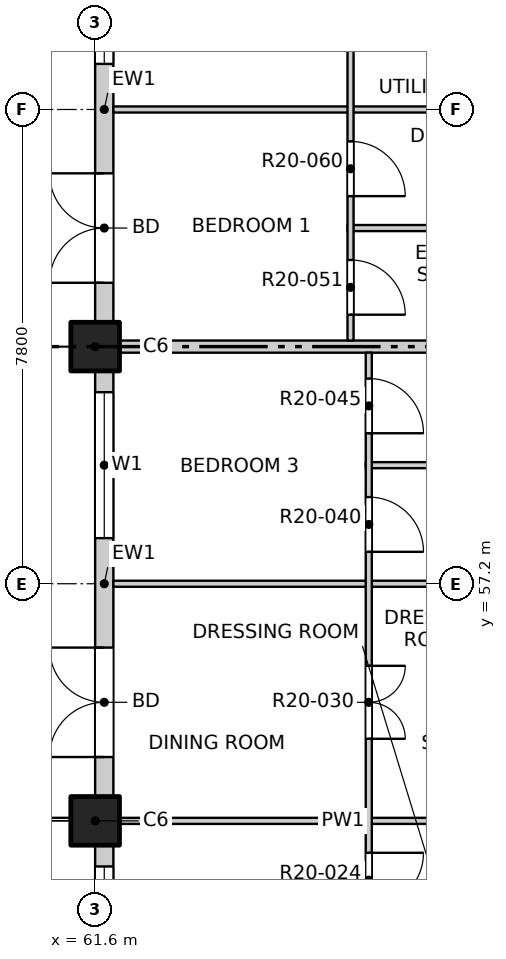
"""IFC4 building model, lengths in metres.
Left out: names, types, materials, properties, quantities, classifications, styles, units other than length and angle.
Written with IfcOpenShell. Run it as: python <this file> out.ifc"""

import sys

from ifc_helpers import new_model, si_unit, direction, frame, frame_2d, origin, origin_2d, place, context, subcontext, project, spatial, rectangle, extrude, element, fill, save


model = new_model("IFC4")
c1 = context("Model", 3, precision=1e-05, world=origin(), true_north=direction((0.0, 1.0)))
c2 = subcontext(c1, "Body", "Model", "MODEL_VIEW")
j1 = project(units=[si_unit("LENGTHUNIT", "METRE"), si_unit("PLANEANGLEUNIT", "RADIAN")], contexts=[c1])
p1 = place(None, origin())
s1 = spatial("IfcSite", under=j1, at=p1, CompositionType="ELEMENT")
p2 = place(p1, origin())
s2 = spatial("IfcBuilding", under=s1, at=p2, CompositionType="ELEMENT")
p3 = place(p2, frame((0.0, 0.0, 204.1)))
s3 = spatial("IfcBuildingStorey", under=s2, at=p3, CompositionType="ELEMENT", Elevation=204.1)
for number, where, z_axis, x_axis in (
    (1, (61.6, 53.3, -0.25), (0.0, 0.0, 1.0), (1.0, 0.0, 0.0)),
    (2, (61.6, 61.1, -0.25), (0.0, 0.0, 1.0), (1.0, 0.0, 0.0)),
):
    element("IfcColumn", number, at=place(p3, frame(where, z_axis=z_axis, x_axis=x_axis)), inside=s3, PredefinedType="COLUMN", context=c2, shape_type="SweptSolid", body=[
        extrude(rectangle(XDim=0.8, YDim=0.8, at=origin_2d()), origin(), (0.0, 0.0, 1.0), 3.4),
    ])
p4 = place(p3, frame((61.75, 45.5, 0.0), z_axis=(0.0, 0.0, 1.0), x_axis=(0.0, 1.0, 0.0)))
e3 = element("IfcWall", 3, at=p4, inside=s3, PredefinedType="SOLIDWALL", context=c2, shape_type="SweptSolid", body=[
    extrude(rectangle(XDim=7.4, YDim=0.3, at=frame_2d((3.7, 0.0))), origin(), (0.0, 0.0, 1.0), 2.7),
])
p5 = place(p4, frame((0.75, 0.0, 0.9)))
e4 = element("IfcOpeningElement", 4, at=p5, cuts=e3, PredefinedType="OPENING", context=c2, shape_type="SweptSolid", body=[
    extrude(rectangle(XDim=2.4, YDim=1.8, at=frame_2d((1.2, 0.9))), frame((0.0, 0.16, 0.0), z_axis=(0.0, -1.0, 0.0), x_axis=(1.0, 0.0, 0.0)), (0.0, 0.0, 1.0), 0.32),
])
p6 = place(p4, frame((4.65, 0.0, 0.9)))
e5 = element("IfcOpeningElement", 5, at=p6, cuts=e3, PredefinedType="OPENING", context=c2, shape_type="SweptSolid", body=[
    extrude(rectangle(XDim=2.4, YDim=1.8, at=frame_2d((1.2, 0.9))), frame((0.0, 0.16, 0.0), z_axis=(0.0, -1.0, 0.0), x_axis=(1.0, 0.0, 0.0)), (0.0, 0.0, 1.0), 0.32),
])
p7 = place(p3, frame((61.75, 53.7, 0.0), z_axis=(0.0, 0.0, 1.0), x_axis=(0.0, 1.0, 0.0)))
e6 = element("IfcWall", 6, at=p7, inside=s3, PredefinedType="SOLIDWALL", context=c2, shape_type="SweptSolid", body=[
    extrude(rectangle(XDim=7.0, YDim=0.3, at=frame_2d((3.5, 0.0))), origin(), (0.0, 0.0, 1.0), 2.7),
])
p8 = place(p7, frame((0.65, 0.0, 0.0)))
e7 = element("IfcOpeningElement", 7, at=p8, cuts=e6, PredefinedType="OPENING", context=c2, shape_type="SweptSolid", body=[
    extrude(rectangle(XDim=1.8, YDim=2.4, at=frame_2d((0.9, 1.2))), frame((0.0, 0.16, 0.0), z_axis=(0.0, -1.0, 0.0), x_axis=(1.0, 0.0, 0.0)), (0.0, 0.0, 1.0), 0.32),
])
p9 = place(p7, frame((4.25, 0.0, 0.9)))
e8 = element("IfcOpeningElement", 8, at=p9, cuts=e6, PredefinedType="OPENING", context=c2, shape_type="SweptSolid", body=[
    extrude(rectangle(XDim=2.4, YDim=1.8, at=frame_2d((1.2, 0.9))), frame((0.0, 0.16, 0.0), z_axis=(0.0, -1.0, 0.0), x_axis=(1.0, 0.0, 0.0)), (0.0, 0.0, 1.0), 0.32),
])
p10 = place(p3, frame((61.75, 61.5, 0.0), z_axis=(0.0, 0.0, 1.0), x_axis=(0.0, 1.0, 0.0)))
e9 = element("IfcWall", 9, at=p10, inside=s3, PredefinedType="SOLIDWALL", context=c2, shape_type="SweptSolid", body=[
    extrude(rectangle(XDim=7.0, YDim=0.3, at=frame_2d((3.5, 0.0))), origin(), (0.0, 0.0, 1.0), 2.7),
])
p11 = place(p10, frame((0.65, 0.0, 0.0)))
e10 = element("IfcOpeningElement", 10, at=p11, cuts=e9, PredefinedType="OPENING", context=c2, shape_type="SweptSolid", body=[
    extrude(rectangle(XDim=1.8, YDim=2.4, at=frame_2d((0.9, 1.2))), frame((0.0, 0.16, 0.0), z_axis=(0.0, -1.0, 0.0), x_axis=(1.0, 0.0, 0.0)), (0.0, 0.0, 1.0), 0.32),
])
p12 = place(p10, frame((4.25, 0.0, 0.9)))
e11 = element("IfcOpeningElement", 11, at=p12, cuts=e9, PredefinedType="OPENING", context=c2, shape_type="SweptSolid", body=[
    extrude(rectangle(XDim=2.4, YDim=1.8, at=frame_2d((1.2, 0.9))), frame((0.0, 0.16, 0.0), z_axis=(0.0, -1.0, 0.0), x_axis=(1.0, 0.0, 0.0)), (0.0, 0.0, 1.0), 0.32),
])
for number, where, z_axis, x_axis in (
    (12, (61.9, 53.3, 0.0), (0.0, 0.0, 1.0), (1.0, 0.0, 0.0)),
    (13, (61.9, 57.2, 0.0), (0.0, 0.0, 1.0), (1.0, 0.0, 0.0)),
):
    element("IfcWall", number, at=place(p3, frame(where, z_axis=z_axis, x_axis=x_axis)), inside=s3, PredefinedType="PARTITIONING", context=c2, shape_type="SweptSolid", body=[
        extrude(rectangle(XDim=7.55, YDim=0.1, at=frame_2d((3.775, 0.0))), origin(), (0.0, 0.0, 1.0), 3.15),
    ])
p13 = place(p3, frame((66.05, 59.15, 0.0), z_axis=(0.0, 0.0, 1.0), x_axis=(1.0, 0.0, 0.0)))
e14 = element("IfcWall", 14, at=p13, inside=s3, PredefinedType="PARTITIONING", context=c2, shape_type="SweptSolid", body=[
    extrude(rectangle(XDim=3.4, YDim=0.1, at=frame_2d((1.7, 0.0))), origin(), (0.0, 0.0, 1.0), 3.15),
])
p14 = place(p3, frame((61.9, 61.1, 0.0), z_axis=(0.0, 0.0, 1.0), x_axis=(1.0, 0.0, 0.0)))
e15 = element("IfcWall", 15, at=p14, inside=s3, PredefinedType="PARTITIONING", context=c2, shape_type="SweptSolid", body=[
    extrude(rectangle(XDim=11.5, YDim=0.2, at=frame_2d((5.75, 0.0))), origin(), (0.0, 0.0, 1.0), 2.55),
])
p15 = place(p3, frame((65.75, 63.05, 0.0), z_axis=(0.0, 0.0, 1.0), x_axis=(1.0, 0.0, 0.0)))
e16 = element("IfcWall", 16, at=p15, inside=s3, PredefinedType="PARTITIONING", context=c2, shape_type="SweptSolid", body=[
    extrude(rectangle(XDim=3.7, YDim=0.1, at=frame_2d((1.85, 0.0))), origin(), (0.0, 0.0, 1.0), 3.15),
])
p16 = place(p3, frame((61.9, 65.0, 0.0), z_axis=(0.0, 0.0, 1.0), x_axis=(1.0, 0.0, 0.0)))
e17 = element("IfcWall", 17, at=p16, inside=s3, PredefinedType="PARTITIONING", context=c2, shape_type="SweptSolid", body=[
    extrude(rectangle(XDim=7.55, YDim=0.1, at=frame_2d((3.775, 0.0))), origin(), (0.0, 0.0, 1.0), 3.15),
])
p17 = place(p3, frame((65.8, 61.2, 0.0), z_axis=(0.0, 0.0, 1.0), x_axis=(0.0, 1.0, 0.0)))
e18 = element("IfcWall", 18, at=p17, inside=s3, PredefinedType="PARTITIONING", context=c2, shape_type="SweptSolid", body=[
    extrude(rectangle(XDim=26.9, YDim=0.1, at=frame_2d((13.45, 0.0))), origin(), (0.0, 0.0, 1.0), 3.15),
])
p18 = place(p17, frame((0.425, 0.0, 0.0)))
e19 = element("IfcOpeningElement", 19, at=p18, cuts=e18, PredefinedType="OPENING", context=c2, shape_type="SweptSolid", body=[
    extrude(rectangle(XDim=0.9, YDim=2.1, at=frame_2d((0.45, 1.05))), frame((0.0, 0.06, 0.0), z_axis=(0.0, -1.0, 0.0), x_axis=(1.0, 0.0, 0.0)), (0.0, 0.0, 1.0), 0.12),
])
p19 = place(p17, frame((2.375, 0.0, 0.0)))
e20 = element("IfcOpeningElement", 20, at=p19, cuts=e18, PredefinedType="OPENING", context=c2, shape_type="SweptSolid", body=[
    extrude(rectangle(XDim=0.9, YDim=2.1, at=frame_2d((0.45, 1.05))), frame((0.0, 0.06, 0.0), z_axis=(0.0, -1.0, 0.0), x_axis=(1.0, 0.0, 0.0)), (0.0, 0.0, 1.0), 0.12),
])
p20 = place(p17, frame((5.15, 0.0, 0.0)))
e21 = element("IfcOpeningElement", 21, at=p20, cuts=e18, PredefinedType="OPENING", context=c2, shape_type="SweptSolid", body=[
    extrude(rectangle(XDim=1.2, YDim=2.1, at=frame_2d((0.6, 1.05))), frame((0.0, 0.06, 0.0), z_axis=(0.0, -1.0, 0.0), x_axis=(1.0, 0.0, 0.0)), (0.0, 0.0, 1.0), 0.12),
])
p21 = place(p17, frame((9.05, 0.0, 0.0)))
e22 = element("IfcOpeningElement", 22, at=p21, cuts=e18, PredefinedType="OPENING", context=c2, shape_type="SweptSolid", body=[
    extrude(rectangle(XDim=1.2, YDim=2.1, at=frame_2d((0.6, 1.05))), frame((0.0, 0.06, 0.0), z_axis=(0.0, -1.0, 0.0), x_axis=(1.0, 0.0, 0.0)), (0.0, 0.0, 1.0), 0.12),
])
p22 = place(p17, frame((12.125, 0.0, 0.0)))
e23 = element("IfcOpeningElement", 23, at=p22, cuts=e18, PredefinedType="OPENING", context=c2, shape_type="SweptSolid", body=[
    extrude(rectangle(XDim=0.9, YDim=2.1, at=frame_2d((0.45, 1.05))), frame((0.0, 0.06, 0.0), z_axis=(0.0, -1.0, 0.0), x_axis=(1.0, 0.0, 0.0)), (0.0, 0.0, 1.0), 0.12),
])
p23 = place(p17, frame((14.075, 0.0, 0.0)))
e24 = element("IfcOpeningElement", 24, at=p23, cuts=e18, PredefinedType="OPENING", context=c2, shape_type="SweptSolid", body=[
    extrude(rectangle(XDim=0.9, YDim=2.1, at=frame_2d((0.45, 1.05))), frame((0.0, 0.06, 0.0), z_axis=(0.0, -1.0, 0.0), x_axis=(1.0, 0.0, 0.0)), (0.0, 0.0, 1.0), 0.12),
])
p24 = place(p17, frame((16.025, 0.0, 0.0)))
e25 = element("IfcOpeningElement", 25, at=p24, cuts=e18, PredefinedType="OPENING", context=c2, shape_type="SweptSolid", body=[
    extrude(rectangle(XDim=0.9, YDim=2.1, at=frame_2d((0.45, 1.05))), frame((0.0, 0.06, 0.0), z_axis=(0.0, -1.0, 0.0), x_axis=(1.0, 0.0, 0.0)), (0.0, 0.0, 1.0), 0.12),
])
p25 = place(p17, frame((17.975, 0.0, 0.0)))
e26 = element("IfcOpeningElement", 26, at=p25, cuts=e18, PredefinedType="OPENING", context=c2, shape_type="SweptSolid", body=[
    extrude(rectangle(XDim=0.9, YDim=2.1, at=frame_2d((0.45, 1.05))), frame((0.0, 0.06, 0.0), z_axis=(0.0, -1.0, 0.0), x_axis=(1.0, 0.0, 0.0)), (0.0, 0.0, 1.0), 0.12),
])
p26 = place(p17, frame((20.75, 0.0, 0.0)))
e27 = element("IfcOpeningElement", 27, at=p26, cuts=e18, PredefinedType="OPENING", context=c2, shape_type="SweptSolid", body=[
    extrude(rectangle(XDim=1.2, YDim=2.1, at=frame_2d((0.6, 1.05))), frame((0.0, 0.06, 0.0), z_axis=(0.0, -1.0, 0.0), x_axis=(1.0, 0.0, 0.0)), (0.0, 0.0, 1.0), 0.12),
])
p27 = place(p17, frame((24.65, 0.0, 0.0)))
e28 = element("IfcOpeningElement", 28, at=p27, cuts=e18, PredefinedType="OPENING", context=c2, shape_type="SweptSolid", body=[
    extrude(rectangle(XDim=1.2, YDim=2.1, at=frame_2d((0.6, 1.05))), frame((0.0, 0.06, 0.0), z_axis=(0.0, -1.0, 0.0), x_axis=(1.0, 0.0, 0.0)), (0.0, 0.0, 1.0), 0.12),
])
p28 = place(p3, frame((66.1, 41.9, 0.0), z_axis=(0.0, 0.0, 1.0), x_axis=(0.0, 1.0, 0.0)))
e29 = element("IfcWall", 29, at=p28, inside=s3, PredefinedType="PARTITIONING", context=c2, shape_type="SweptSolid", body=[
    extrude(rectangle(XDim=19.1, YDim=0.1, at=frame_2d((9.55, 0.0))), origin(), (0.0, 0.0, 1.0), 3.15),
])
p29 = place(p28, frame((1.05, 0.0, 0.0)))
e30 = element("IfcOpeningElement", 30, at=p29, cuts=e29, PredefinedType="OPENING", context=c2, shape_type="SweptSolid", body=[
    extrude(rectangle(XDim=1.2, YDim=2.1, at=frame_2d((0.6, 1.05))), frame((0.0, 0.06, 0.0), z_axis=(0.0, -1.0, 0.0), x_axis=(1.0, 0.0, 0.0)), (0.0, 0.0, 1.0), 0.12),
])
p30 = place(p28, frame((4.95, 0.0, 0.0)))
e31 = element("IfcOpeningElement", 31, at=p30, cuts=e29, PredefinedType="OPENING", context=c2, shape_type="SweptSolid", body=[
    extrude(rectangle(XDim=1.2, YDim=2.1, at=frame_2d((0.6, 1.05))), frame((0.0, 0.06, 0.0), z_axis=(0.0, -1.0, 0.0), x_axis=(1.0, 0.0, 0.0)), (0.0, 0.0, 1.0), 0.12),
])
p31 = place(p28, frame((8.025, 0.0, 0.0)))
e32 = element("IfcOpeningElement", 32, at=p31, cuts=e29, PredefinedType="OPENING", context=c2, shape_type="SweptSolid", body=[
    extrude(rectangle(XDim=0.9, YDim=2.1, at=frame_2d((0.45, 1.05))), frame((0.0, 0.06, 0.0), z_axis=(0.0, -1.0, 0.0), x_axis=(1.0, 0.0, 0.0)), (0.0, 0.0, 1.0), 0.12),
])
p32 = place(p28, frame((9.975, 0.0, 0.0)))
e33 = element("IfcOpeningElement", 33, at=p32, cuts=e29, PredefinedType="OPENING", context=c2, shape_type="SweptSolid", body=[
    extrude(rectangle(XDim=0.9, YDim=2.1, at=frame_2d((0.45, 1.05))), frame((0.0, 0.06, 0.0), z_axis=(0.0, -1.0, 0.0), x_axis=(1.0, 0.0, 0.0)), (0.0, 0.0, 1.0), 0.12),
])
p33 = place(p28, frame((12.75, 0.0, 0.0)))
e34 = element("IfcOpeningElement", 34, at=p33, cuts=e29, PredefinedType="OPENING", context=c2, shape_type="SweptSolid", body=[
    extrude(rectangle(XDim=1.2, YDim=2.1, at=frame_2d((0.6, 1.05))), frame((0.0, 0.06, 0.0), z_axis=(0.0, -1.0, 0.0), x_axis=(1.0, 0.0, 0.0)), (0.0, 0.0, 1.0), 0.12),
])
p34 = place(p28, frame((15.825, 0.0, 0.0)))
e35 = element("IfcOpeningElement", 35, at=p34, cuts=e29, PredefinedType="OPENING", context=c2, shape_type="SweptSolid", body=[
    extrude(rectangle(XDim=0.9, YDim=2.1, at=frame_2d((0.45, 1.05))), frame((0.0, 0.06, 0.0), z_axis=(0.0, -1.0, 0.0), x_axis=(1.0, 0.0, 0.0)), (0.0, 0.0, 1.0), 0.12),
])
p35 = place(p28, frame((17.775, 0.0, 0.0)))
e36 = element("IfcOpeningElement", 36, at=p35, cuts=e29, PredefinedType="OPENING", context=c2, shape_type="SweptSolid", body=[
    extrude(rectangle(XDim=0.9, YDim=2.1, at=frame_2d((0.45, 1.05))), frame((0.0, 0.06, 0.0), z_axis=(0.0, -1.0, 0.0), x_axis=(1.0, 0.0, 0.0)), (0.0, 0.0, 1.0), 0.12),
])
p36 = place(p6, origin())
e37 = element("IfcWindow", 37, at=p36, inside=s3, PartitioningType="DOUBLE_PANEL_VERTICAL", PredefinedType="WINDOW", context=c2, shape_type="SweptSolid", body=[
    extrude(rectangle(XDim=2.4, YDim=1.8, at=frame_2d((1.2, 0.9))), frame((0.0, 0.03, 0.0), z_axis=(0.0, -1.0, 0.0), x_axis=(1.0, 0.0, 0.0)), (0.0, 0.0, 1.0), 0.06),
])
fill(e5, e37)
p37 = place(p8, origin())
e38 = element("IfcDoor", 38, at=p37, inside=s3, OperationType="DOUBLE_DOOR_SINGLE_SWING", PredefinedType="DOOR", context=c2, shape_type="SweptSolid", body=[
    extrude(rectangle(XDim=1.8, YDim=2.4, at=frame_2d((0.9, 1.2))), frame((0.0, 0.025, 0.0), z_axis=(0.0, -1.0, 0.0), x_axis=(1.0, 0.0, 0.0)), (0.0, 0.0, 1.0), 0.05),
])
fill(e7, e38)
p38 = place(p9, origin())
e39 = element("IfcWindow", 39, at=p38, inside=s3, PartitioningType="DOUBLE_PANEL_VERTICAL", PredefinedType="WINDOW", context=c2, shape_type="SweptSolid", body=[
    extrude(rectangle(XDim=2.4, YDim=1.8, at=frame_2d((1.2, 0.9))), frame((0.0, 0.03, 0.0), z_axis=(0.0, -1.0, 0.0), x_axis=(1.0, 0.0, 0.0)), (0.0, 0.0, 1.0), 0.06),
])
fill(e8, e39)
p39 = place(p11, origin())
e40 = element("IfcDoor", 40, at=p39, inside=s3, OperationType="DOUBLE_DOOR_SINGLE_SWING", PredefinedType="DOOR", context=c2, shape_type="SweptSolid", body=[
    extrude(rectangle(XDim=1.8, YDim=2.4, at=frame_2d((0.9, 1.2))), frame((0.0, 0.025, 0.0), z_axis=(0.0, -1.0, 0.0), x_axis=(1.0, 0.0, 0.0)), (0.0, 0.0, 1.0), 0.05),
])
fill(e10, e40)
p40 = place(p12, origin())
e41 = element("IfcWindow", 41, at=p40, inside=s3, PartitioningType="DOUBLE_PANEL_VERTICAL", PredefinedType="WINDOW", context=c2, shape_type="SweptSolid", body=[
    extrude(rectangle(XDim=2.4, YDim=1.8, at=frame_2d((1.2, 0.9))), frame((0.0, 0.03, 0.0), z_axis=(0.0, -1.0, 0.0), x_axis=(1.0, 0.0, 0.0)), (0.0, 0.0, 1.0), 0.06),
])
fill(e11, e41)
p41 = place(p32, origin())
e42 = element("IfcDoor", 42, at=p41, inside=s3, OperationType="SINGLE_SWING_LEFT", PredefinedType="DOOR", context=c2, shape_type="SweptSolid", body=[
    extrude(rectangle(XDim=0.9, YDim=2.1, at=frame_2d((0.45, 1.05))), frame((0.0, 0.025, 0.0), z_axis=(0.0, -1.0, 0.0), x_axis=(1.0, 0.0, 0.0)), (0.0, 0.0, 1.0), 0.05),
])
fill(e33, e42)
p42 = place(p33, origin())
e43 = element("IfcDoor", 43, at=p42, inside=s3, OperationType="DOUBLE_DOOR_SINGLE_SWING", PredefinedType="DOOR", context=c2, shape_type="SweptSolid", body=[
    extrude(rectangle(XDim=1.2, YDim=2.1, at=frame_2d((0.6, 1.05))), frame((0.0, 0.025, 0.0), z_axis=(0.0, -1.0, 0.0), x_axis=(1.0, 0.0, 0.0)), (0.0, 0.0, 1.0), 0.05),
])
fill(e34, e43)
p43 = place(p34, origin())
e44 = element("IfcDoor", 44, at=p43, inside=s3, OperationType="SINGLE_SWING_RIGHT", PredefinedType="DOOR", context=c2, shape_type="SweptSolid", body=[
    extrude(rectangle(XDim=0.9, YDim=2.1, at=frame_2d((0.45, 1.05))), frame((0.0, 0.025, 0.0), z_axis=(0.0, -1.0, 0.0), x_axis=(1.0, 0.0, 0.0)), (0.0, 0.0, 1.0), 0.05),
])
fill(e35, e44)
p44 = place(p35, origin())
e45 = element("IfcDoor", 45, at=p44, inside=s3, OperationType="SINGLE_SWING_RIGHT", PredefinedType="DOOR", context=c2, shape_type="SweptSolid", body=[
    extrude(rectangle(XDim=0.9, YDim=2.1, at=frame_2d((0.45, 1.05))), frame((0.0, 0.025, 0.0), z_axis=(0.0, -1.0, 0.0), x_axis=(1.0, 0.0, 0.0)), (0.0, 0.0, 1.0), 0.05),
])
fill(e36, e45)
p45 = place(p18, origin())
e46 = element("IfcDoor", 46, at=p45, inside=s3, OperationType="SINGLE_SWING_RIGHT", PredefinedType="DOOR", context=c2, shape_type="SweptSolid", body=[
    extrude(rectangle(XDim=0.9, YDim=2.1, at=frame_2d((0.45, 1.05))), frame((0.0, 0.025, 0.0), z_axis=(0.0, -1.0, 0.0), x_axis=(1.0, 0.0, 0.0)), (0.0, 0.0, 1.0), 0.05),
])
fill(e19, e46)
p46 = place(p19, origin())
e47 = element("IfcDoor", 47, at=p46, inside=s3, OperationType="SINGLE_SWING_RIGHT", PredefinedType="DOOR", context=c2, shape_type="SweptSolid", body=[
    extrude(rectangle(XDim=0.9, YDim=2.1, at=frame_2d((0.45, 1.05))), frame((0.0, 0.025, 0.0), z_axis=(0.0, -1.0, 0.0), x_axis=(1.0, 0.0, 0.0)), (0.0, 0.0, 1.0), 0.05),
])
fill(e20, e47)
save(model, sys.argv[1])
